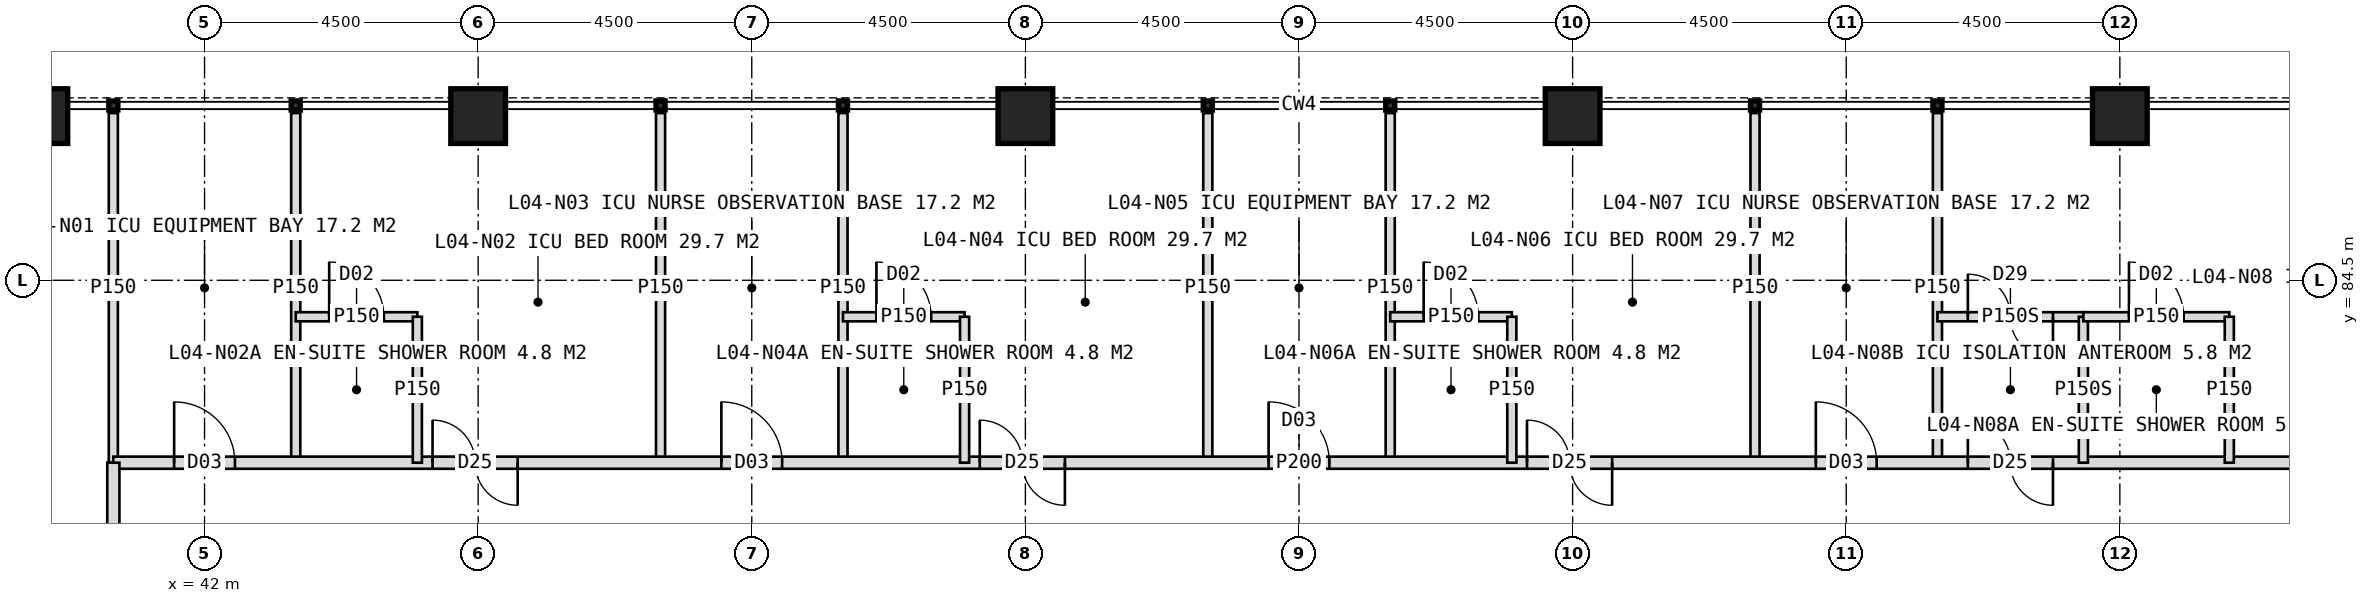
"""IFC4 building model, lengths in metres.
Left out: names, types, materials, properties, quantities, classifications, styles, units other than length and angle.
Written with IfcOpenShell. Run it as: python <this file> out.ifc"""

import sys

from ifc_helpers import new_model, si_unit, direction, frame, frame_2d, origin, origin_2d, place, context, subcontext, project, spatial, rectangle, hollow_rectangle, extrude, element, fill, save


model = new_model("IFC4")
c1 = context("Model", 3, precision=1e-05, world=origin(), true_north=direction((0.0, 1.0)))
c2 = subcontext(c1, "Body", "Model", "MODEL_VIEW")
j1 = project(units=[si_unit("LENGTHUNIT", "METRE"), si_unit("PLANEANGLEUNIT", "RADIAN")], contexts=[c1])
p1 = place(None, origin())
s1 = spatial("IfcSite", under=j1, at=p1, CompositionType="ELEMENT")
p2 = place(p1, origin())
s2 = spatial("IfcBuilding", under=s1, at=p2, CompositionType="ELEMENT")
p3 = place(p2, frame((0.0, 0.0, 21.0)))
s3 = spatial("IfcBuildingStorey", under=s2, at=p3, CompositionType="ELEMENT", Elevation=21.0)
for number, where, z_axis, x_axis in (
    (1, (39.3, 87.2, 0.0), (0.0, 0.0, 1.0), (1.0, 0.0, 0.0)),
    (2, (46.5, 87.2, 0.0), (0.0, 0.0, 1.0), (1.0, 0.0, 0.0)),
    (3, (55.5, 87.2, 0.0), (0.0, 0.0, 1.0), (1.0, 0.0, 0.0)),
    (4, (64.5, 87.2, 0.0), (0.0, 0.0, 1.0), (1.0, 0.0, 0.0)),
    (5, (73.5, 87.2, 0.0), (0.0, 0.0, 1.0), (1.0, 0.0, 0.0)),
):
    element("IfcColumn", number, at=place(p3, frame(where, z_axis=z_axis, x_axis=x_axis)), inside=s3, PredefinedType="COLUMN", context=c2, shape_type="SweptSolid", body=[
        extrude(hollow_rectangle(XDim=0.9, YDim=0.9, WallThickness=0.08, at=origin_2d()), origin(), (0.0, 0.0, 1.0), 5.0),
    ])
for number, where, z_axis, x_axis in (
    (6, (40.5, 81.5, 0.0), (0.0, 0.0, 1.0), (0.0, 1.0, 0.0)),
    (7, (43.5, 81.5, 0.0), (0.0, 0.0, 1.0), (0.0, 1.0, 0.0)),
    (8, (49.5, 81.5, 0.0), (0.0, 0.0, 1.0), (0.0, 1.0, 0.0)),
    (9, (52.5, 81.5, 0.0), (0.0, 0.0, 1.0), (0.0, 1.0, 0.0)),
    (10, (58.5, 81.5, 0.0), (0.0, 0.0, 1.0), (0.0, 1.0, 0.0)),
    (11, (61.5, 81.5, 0.0), (0.0, 0.0, 1.0), (0.0, 1.0, 0.0)),
    (12, (67.5, 81.5, 0.0), (0.0, 0.0, 1.0), (0.0, 1.0, 0.0)),
    (13, (70.5, 81.5, 0.0), (0.0, 0.0, 1.0), (0.0, 1.0, 0.0)),
):
    element("IfcWall", number, at=place(p3, frame(where, z_axis=z_axis, x_axis=x_axis)), inside=s3, PredefinedType="PARTITIONING", context=c2, shape_type="SweptSolid", body=[
        extrude(rectangle(XDim=5.75, YDim=0.15, at=frame_2d((2.875, 0.0))), origin(), (0.0, 0.0, 1.0), 4.7),
    ])
p4 = place(p3, frame((40.5, 81.5, 0.0), z_axis=(0.0, 0.0, 1.0), x_axis=(1.0, 0.0, 0.0)))
e14 = element("IfcWall", 14, at=p4, inside=s3, PredefinedType="PARTITIONING", context=c2, shape_type="SweptSolid", body=[
    extrude(rectangle(XDim=39.0, YDim=0.2, at=frame_2d((19.5, 0.0))), origin(), (0.0, 0.0, 1.0), 4.7),
])
p5 = place(p4, frame((1.0, 0.0, 0.0)))
e15 = element("IfcOpeningElement", 15, at=p5, cuts=e14, PredefinedType="OPENING", context=c2, shape_type="SweptSolid", body=[
    extrude(rectangle(XDim=1.0, YDim=2.1, at=frame_2d((0.5, 1.05))), frame((0.0, 0.11, 0.0), z_axis=(0.0, -1.0, 0.0), x_axis=(1.0, 0.0, 0.0)), (0.0, 0.0, 1.0), 0.22),
])
p6 = place(p4, frame((5.25, 0.0, 0.0)))
e16 = element("IfcOpeningElement", 16, at=p6, cuts=e14, PredefinedType="OPENING", context=c2, shape_type="SweptSolid", body=[
    extrude(rectangle(XDim=1.4, YDim=2.2, at=frame_2d((0.7, 1.1))), frame((0.0, 0.11, 0.0), z_axis=(0.0, -1.0, 0.0), x_axis=(1.0, 0.0, 0.0)), (0.0, 0.0, 1.0), 0.22),
])
p7 = place(p4, frame((10.0, 0.0, 0.0)))
e17 = element("IfcOpeningElement", 17, at=p7, cuts=e14, PredefinedType="OPENING", context=c2, shape_type="SweptSolid", body=[
    extrude(rectangle(XDim=1.0, YDim=2.1, at=frame_2d((0.5, 1.05))), frame((0.0, 0.11, 0.0), z_axis=(0.0, -1.0, 0.0), x_axis=(1.0, 0.0, 0.0)), (0.0, 0.0, 1.0), 0.22),
])
p8 = place(p4, frame((14.25, 0.0, 0.0)))
e18 = element("IfcOpeningElement", 18, at=p8, cuts=e14, PredefinedType="OPENING", context=c2, shape_type="SweptSolid", body=[
    extrude(rectangle(XDim=1.4, YDim=2.2, at=frame_2d((0.7, 1.1))), frame((0.0, 0.11, 0.0), z_axis=(0.0, -1.0, 0.0), x_axis=(1.0, 0.0, 0.0)), (0.0, 0.0, 1.0), 0.22),
])
p9 = place(p4, frame((19.0, 0.0, 0.0)))
e19 = element("IfcOpeningElement", 19, at=p9, cuts=e14, PredefinedType="OPENING", context=c2, shape_type="SweptSolid", body=[
    extrude(rectangle(XDim=1.0, YDim=2.1, at=frame_2d((0.5, 1.05))), frame((0.0, 0.11, 0.0), z_axis=(0.0, -1.0, 0.0), x_axis=(1.0, 0.0, 0.0)), (0.0, 0.0, 1.0), 0.22),
])
p10 = place(p4, frame((23.25, 0.0, 0.0)))
e20 = element("IfcOpeningElement", 20, at=p10, cuts=e14, PredefinedType="OPENING", context=c2, shape_type="SweptSolid", body=[
    extrude(rectangle(XDim=1.4, YDim=2.2, at=frame_2d((0.7, 1.1))), frame((0.0, 0.11, 0.0), z_axis=(0.0, -1.0, 0.0), x_axis=(1.0, 0.0, 0.0)), (0.0, 0.0, 1.0), 0.22),
])
p11 = place(p4, frame((28.0, 0.0, 0.0)))
e21 = element("IfcOpeningElement", 21, at=p11, cuts=e14, PredefinedType="OPENING", context=c2, shape_type="SweptSolid", body=[
    extrude(rectangle(XDim=1.0, YDim=2.1, at=frame_2d((0.5, 1.05))), frame((0.0, 0.11, 0.0), z_axis=(0.0, -1.0, 0.0), x_axis=(1.0, 0.0, 0.0)), (0.0, 0.0, 1.0), 0.22),
])
p12 = place(p4, frame((30.5, 0.0, 0.0)))
e22 = element("IfcOpeningElement", 22, at=p12, cuts=e14, PredefinedType="OPENING", context=c2, shape_type="SweptSolid", body=[
    extrude(rectangle(XDim=1.4, YDim=2.2, at=frame_2d((0.7, 1.1))), frame((0.0, 0.11, 0.0), z_axis=(0.0, -1.0, 0.0), x_axis=(1.0, 0.0, 0.0)), (0.0, 0.0, 1.0), 0.22),
])
p13 = place(p3, frame((43.5, 83.9, 0.0), z_axis=(0.0, 0.0, 1.0), x_axis=(1.0, 0.0, 0.0)))
e23 = element("IfcWall", 23, at=p13, inside=s3, PredefinedType="PARTITIONING", context=c2, shape_type="SweptSolid", body=[
    extrude(rectangle(XDim=2.0, YDim=0.15, at=frame_2d((1.0, 0.0))), origin(), (0.0, 0.0, 1.0), 4.7),
])
p14 = place(p13, frame((0.55, 0.0, 0.0)))
e24 = element("IfcOpeningElement", 24, at=p14, cuts=e23, PredefinedType="OPENING", context=c2, shape_type="SweptSolid", body=[
    extrude(rectangle(XDim=0.9, YDim=2.1, at=frame_2d((0.45, 1.05))), frame((0.0, 0.085, 0.0), z_axis=(0.0, -1.0, 0.0), x_axis=(1.0, 0.0, 0.0)), (0.0, 0.0, 1.0), 0.17),
])
p15 = place(p3, frame((45.5, 81.5, 0.0), z_axis=(0.0, 0.0, 1.0), x_axis=(0.0, 1.0, 0.0)))
e25 = element("IfcWall", 25, at=p15, inside=s3, PredefinedType="PARTITIONING", context=c2, shape_type="SweptSolid", body=[
    extrude(rectangle(XDim=2.4, YDim=0.15, at=frame_2d((1.2, 0.0))), origin(), (0.0, 0.0, 1.0), 4.7),
])
p16 = place(p3, frame((52.5, 83.9, 0.0), z_axis=(0.0, 0.0, 1.0), x_axis=(1.0, 0.0, 0.0)))
e26 = element("IfcWall", 26, at=p16, inside=s3, PredefinedType="PARTITIONING", context=c2, shape_type="SweptSolid", body=[
    extrude(rectangle(XDim=2.0, YDim=0.15, at=frame_2d((1.0, 0.0))), origin(), (0.0, 0.0, 1.0), 4.7),
])
p17 = place(p16, frame((0.55, 0.0, 0.0)))
e27 = element("IfcOpeningElement", 27, at=p17, cuts=e26, PredefinedType="OPENING", context=c2, shape_type="SweptSolid", body=[
    extrude(rectangle(XDim=0.9, YDim=2.1, at=frame_2d((0.45, 1.05))), frame((0.0, 0.085, 0.0), z_axis=(0.0, -1.0, 0.0), x_axis=(1.0, 0.0, 0.0)), (0.0, 0.0, 1.0), 0.17),
])
p18 = place(p3, frame((54.5, 81.5, 0.0), z_axis=(0.0, 0.0, 1.0), x_axis=(0.0, 1.0, 0.0)))
e28 = element("IfcWall", 28, at=p18, inside=s3, PredefinedType="PARTITIONING", context=c2, shape_type="SweptSolid", body=[
    extrude(rectangle(XDim=2.4, YDim=0.15, at=frame_2d((1.2, 0.0))), origin(), (0.0, 0.0, 1.0), 4.7),
])
p19 = place(p3, frame((61.5, 83.9, 0.0), z_axis=(0.0, 0.0, 1.0), x_axis=(1.0, 0.0, 0.0)))
e29 = element("IfcWall", 29, at=p19, inside=s3, PredefinedType="PARTITIONING", context=c2, shape_type="SweptSolid", body=[
    extrude(rectangle(XDim=2.0, YDim=0.15, at=frame_2d((1.0, 0.0))), origin(), (0.0, 0.0, 1.0), 4.7),
])
p20 = place(p19, frame((0.55, 0.0, 0.0)))
e30 = element("IfcOpeningElement", 30, at=p20, cuts=e29, PredefinedType="OPENING", context=c2, shape_type="SweptSolid", body=[
    extrude(rectangle(XDim=0.9, YDim=2.1, at=frame_2d((0.45, 1.05))), frame((0.0, 0.085, 0.0), z_axis=(0.0, -1.0, 0.0), x_axis=(1.0, 0.0, 0.0)), (0.0, 0.0, 1.0), 0.17),
])
p21 = place(p3, frame((63.5, 81.5, 0.0), z_axis=(0.0, 0.0, 1.0), x_axis=(0.0, 1.0, 0.0)))
e31 = element("IfcWall", 31, at=p21, inside=s3, PredefinedType="PARTITIONING", context=c2, shape_type="SweptSolid", body=[
    extrude(rectangle(XDim=2.4, YDim=0.15, at=frame_2d((1.2, 0.0))), origin(), (0.0, 0.0, 1.0), 4.7),
])
p22 = place(p3, frame((70.5, 83.9, 0.0), z_axis=(0.0, 0.0, 1.0), x_axis=(1.0, 0.0, 0.0)))
e32 = element("IfcWall", 32, at=p22, inside=s3, PredefinedType="PARTITIONING", context=c2, shape_type="SweptSolid", body=[
    extrude(rectangle(XDim=2.4, YDim=0.15, at=frame_2d((1.2, 0.0))), origin(), (0.0, 0.0, 1.0), 4.7),
])
p23 = place(p22, frame((0.5, 0.0, 0.0)))
e33 = element("IfcOpeningElement", 33, at=p23, cuts=e32, PredefinedType="OPENING", context=c2, shape_type="SweptSolid", body=[
    extrude(rectangle(XDim=1.4, YDim=2.2, at=frame_2d((0.7, 1.1))), frame((0.0, 0.085, 0.0), z_axis=(0.0, -1.0, 0.0), x_axis=(1.0, 0.0, 0.0)), (0.0, 0.0, 1.0), 0.17),
])
p24 = place(p3, frame((72.9, 81.5, 0.0), z_axis=(0.0, 0.0, 1.0), x_axis=(0.0, 1.0, 0.0)))
e34 = element("IfcWall", 34, at=p24, inside=s3, PredefinedType="PARTITIONING", context=c2, shape_type="SweptSolid", body=[
    extrude(rectangle(XDim=2.4, YDim=0.15, at=frame_2d((1.2, 0.0))), origin(), (0.0, 0.0, 1.0), 4.7),
])
p25 = place(p3, frame((72.9, 83.9, 0.0), z_axis=(0.0, 0.0, 1.0), x_axis=(1.0, 0.0, 0.0)))
e35 = element("IfcWall", 35, at=p25, inside=s3, PredefinedType="PARTITIONING", context=c2, shape_type="SweptSolid", body=[
    extrude(rectangle(XDim=2.4, YDim=0.15, at=frame_2d((1.2, 0.0))), origin(), (0.0, 0.0, 1.0), 4.7),
])
p26 = place(p25, frame((0.75, 0.0, 0.0)))
e36 = element("IfcOpeningElement", 36, at=p26, cuts=e35, PredefinedType="OPENING", context=c2, shape_type="SweptSolid", body=[
    extrude(rectangle(XDim=0.9, YDim=2.1, at=frame_2d((0.45, 1.05))), frame((0.0, 0.085, 0.0), z_axis=(0.0, -1.0, 0.0), x_axis=(1.0, 0.0, 0.0)), (0.0, 0.0, 1.0), 0.17),
])
p27 = place(p3, frame((75.3, 81.5, 0.0), z_axis=(0.0, 0.0, 1.0), x_axis=(0.0, 1.0, 0.0)))
e37 = element("IfcWall", 37, at=p27, inside=s3, PredefinedType="PARTITIONING", context=c2, shape_type="SweptSolid", body=[
    extrude(rectangle(XDim=2.4, YDim=0.15, at=frame_2d((1.2, 0.0))), origin(), (0.0, 0.0, 1.0), 4.7),
])
p28 = place(p3, frame((40.5, 42.5, 0.0), z_axis=(0.0, 0.0, 1.0), x_axis=(0.0, 1.0, 0.0)))
e38 = element("IfcWall", 38, at=p28, inside=s3, PredefinedType="PARTITIONING", context=c2, shape_type="SweptSolid", body=[
    extrude(rectangle(XDim=39.0, YDim=0.2, at=frame_2d((19.5, 0.0))), origin(), (0.0, 0.0, 1.0), 4.7),
])
p29 = place(p28, frame((0.65, 0.0, 0.0)))
e39 = element("IfcOpeningElement", 39, at=p29, cuts=e38, PredefinedType="OPENING", context=c2, shape_type="SweptSolid", body=[
    extrude(rectangle(XDim=1.6, YDim=2.2, at=frame_2d((0.8, 1.1))), frame((0.0, 0.11, 0.0), z_axis=(0.0, -1.0, 0.0), x_axis=(1.0, 0.0, 0.0)), (0.0, 0.0, 1.0), 0.22),
])
p30 = place(p28, frame((7.4, 0.0, 0.0)))
e40 = element("IfcOpeningElement", 40, at=p30, cuts=e38, PredefinedType="OPENING", context=c2, shape_type="SweptSolid", body=[
    extrude(rectangle(XDim=1.6, YDim=2.2, at=frame_2d((0.8, 1.1))), frame((0.0, 0.11, 0.0), z_axis=(0.0, -1.0, 0.0), x_axis=(1.0, 0.0, 0.0)), (0.0, 0.0, 1.0), 0.22),
])
p31 = place(p28, frame((15.7, 0.0, 0.0)))
e41 = element("IfcOpeningElement", 41, at=p31, cuts=e38, PredefinedType="OPENING", context=c2, shape_type="SweptSolid", body=[
    extrude(rectangle(XDim=1.6, YDim=2.2, at=frame_2d((0.8, 1.1))), frame((0.0, 0.11, 0.0), z_axis=(0.0, -1.0, 0.0), x_axis=(1.0, 0.0, 0.0)), (0.0, 0.0, 1.0), 0.22),
])
p32 = place(p28, frame((19.95, 0.0, 0.0)))
e42 = element("IfcOpeningElement", 42, at=p32, cuts=e38, PredefinedType="OPENING", context=c2, shape_type="SweptSolid", body=[
    extrude(rectangle(XDim=1.6, YDim=2.2, at=frame_2d((0.8, 1.1))), frame((0.0, 0.11, 0.0), z_axis=(0.0, -1.0, 0.0), x_axis=(1.0, 0.0, 0.0)), (0.0, 0.0, 1.0), 0.22),
])
p33 = place(p28, frame((24.45, 0.0, 0.0)))
e43 = element("IfcOpeningElement", 43, at=p33, cuts=e38, PredefinedType="OPENING", context=c2, shape_type="SweptSolid", body=[
    extrude(rectangle(XDim=1.6, YDim=2.2, at=frame_2d((0.8, 1.1))), frame((0.0, 0.11, 0.0), z_axis=(0.0, -1.0, 0.0), x_axis=(1.0, 0.0, 0.0)), (0.0, 0.0, 1.0), 0.22),
])
p34 = place(p28, frame((33.25, 0.0, 0.0)))
e44 = element("IfcOpeningElement", 44, at=p34, cuts=e38, PredefinedType="OPENING", context=c2, shape_type="SweptSolid", body=[
    extrude(rectangle(XDim=1.0, YDim=2.1, at=frame_2d((0.5, 1.05))), frame((0.0, 0.11, 0.0), z_axis=(0.0, -1.0, 0.0), x_axis=(1.0, 0.0, 0.0)), (0.0, 0.0, 1.0), 0.22),
])
p35 = place(p5, origin())
e45 = element("IfcDoor", 45, at=p35, inside=s3, OperationType="SINGLE_SWING_LEFT", PredefinedType="DOOR", context=c2, shape_type="SweptSolid", body=[
    extrude(rectangle(XDim=1.0, YDim=2.1, at=frame_2d((0.5, 1.05))), frame((0.0, 0.025, 0.0), z_axis=(0.0, -1.0, 0.0), x_axis=(1.0, 0.0, 0.0)), (0.0, 0.0, 1.0), 0.05),
])
fill(e15, e45)
p36 = place(p14, origin())
e46 = element("IfcDoor", 46, at=p36, inside=s3, OperationType="SINGLE_SWING_LEFT", PredefinedType="DOOR", context=c2, shape_type="SweptSolid", body=[
    extrude(rectangle(XDim=0.9, YDim=2.1, at=frame_2d((0.45, 1.05))), frame((0.0, 0.025, 0.0), z_axis=(0.0, -1.0, 0.0), x_axis=(1.0, 0.0, 0.0)), (0.0, 0.0, 1.0), 0.05),
])
fill(e24, e46)
p37 = place(p6, origin())
e47 = element("IfcDoor", 47, at=p37, inside=s3, OperationType="DOUBLE_DOOR_SINGLE_SWING", PredefinedType="DOOR", context=c2, shape_type="SweptSolid", body=[
    extrude(rectangle(XDim=1.4, YDim=2.2, at=frame_2d((0.7, 1.1))), frame((0.0, 0.025, 0.0), z_axis=(0.0, -1.0, 0.0), x_axis=(1.0, 0.0, 0.0)), (0.0, 0.0, 1.0), 0.05),
])
fill(e16, e47)
p38 = place(p7, origin())
e48 = element("IfcDoor", 48, at=p38, inside=s3, OperationType="SINGLE_SWING_LEFT", PredefinedType="DOOR", context=c2, shape_type="SweptSolid", body=[
    extrude(rectangle(XDim=1.0, YDim=2.1, at=frame_2d((0.5, 1.05))), frame((0.0, 0.025, 0.0), z_axis=(0.0, -1.0, 0.0), x_axis=(1.0, 0.0, 0.0)), (0.0, 0.0, 1.0), 0.05),
])
fill(e17, e48)
p39 = place(p17, origin())
e49 = element("IfcDoor", 49, at=p39, inside=s3, OperationType="SINGLE_SWING_LEFT", PredefinedType="DOOR", context=c2, shape_type="SweptSolid", body=[
    extrude(rectangle(XDim=0.9, YDim=2.1, at=frame_2d((0.45, 1.05))), frame((0.0, 0.025, 0.0), z_axis=(0.0, -1.0, 0.0), x_axis=(1.0, 0.0, 0.0)), (0.0, 0.0, 1.0), 0.05),
])
fill(e27, e49)
p40 = place(p8, origin())
e50 = element("IfcDoor", 50, at=p40, inside=s3, OperationType="DOUBLE_DOOR_SINGLE_SWING", PredefinedType="DOOR", context=c2, shape_type="SweptSolid", body=[
    extrude(rectangle(XDim=1.4, YDim=2.2, at=frame_2d((0.7, 1.1))), frame((0.0, 0.025, 0.0), z_axis=(0.0, -1.0, 0.0), x_axis=(1.0, 0.0, 0.0)), (0.0, 0.0, 1.0), 0.05),
])
fill(e18, e50)
p41 = place(p9, origin())
e51 = element("IfcDoor", 51, at=p41, inside=s3, OperationType="SINGLE_SWING_LEFT", PredefinedType="DOOR", context=c2, shape_type="SweptSolid", body=[
    extrude(rectangle(XDim=1.0, YDim=2.1, at=frame_2d((0.5, 1.05))), frame((0.0, 0.025, 0.0), z_axis=(0.0, -1.0, 0.0), x_axis=(1.0, 0.0, 0.0)), (0.0, 0.0, 1.0), 0.05),
])
fill(e19, e51)
p42 = place(p20, origin())
e52 = element("IfcDoor", 52, at=p42, inside=s3, OperationType="SINGLE_SWING_LEFT", PredefinedType="DOOR", context=c2, shape_type="SweptSolid", body=[
    extrude(rectangle(XDim=0.9, YDim=2.1, at=frame_2d((0.45, 1.05))), frame((0.0, 0.025, 0.0), z_axis=(0.0, -1.0, 0.0), x_axis=(1.0, 0.0, 0.0)), (0.0, 0.0, 1.0), 0.05),
])
fill(e30, e52)
p43 = place(p10, origin())
e53 = element("IfcDoor", 53, at=p43, inside=s3, OperationType="DOUBLE_DOOR_SINGLE_SWING", PredefinedType="DOOR", context=c2, shape_type="SweptSolid", body=[
    extrude(rectangle(XDim=1.4, YDim=2.2, at=frame_2d((0.7, 1.1))), frame((0.0, 0.025, 0.0), z_axis=(0.0, -1.0, 0.0), x_axis=(1.0, 0.0, 0.0)), (0.0, 0.0, 1.0), 0.05),
])
fill(e20, e53)
p44 = place(p11, origin())
e54 = element("IfcDoor", 54, at=p44, inside=s3, OperationType="SINGLE_SWING_LEFT", PredefinedType="DOOR", context=c2, shape_type="SweptSolid", body=[
    extrude(rectangle(XDim=1.0, YDim=2.1, at=frame_2d((0.5, 1.05))), frame((0.0, 0.025, 0.0), z_axis=(0.0, -1.0, 0.0), x_axis=(1.0, 0.0, 0.0)), (0.0, 0.0, 1.0), 0.05),
])
fill(e21, e54)
p45 = place(p23, origin())
e55 = element("IfcDoor", 55, at=p45, inside=s3, OperationType="DOUBLE_DOOR_SINGLE_SWING", PredefinedType="DOOR", context=c2, shape_type="SweptSolid", body=[
    extrude(rectangle(XDim=1.4, YDim=2.2, at=frame_2d((0.7, 1.1))), frame((0.0, 0.025, 0.0), z_axis=(0.0, -1.0, 0.0), x_axis=(1.0, 0.0, 0.0)), (0.0, 0.0, 1.0), 0.05),
])
fill(e33, e55)
p46 = place(p12, origin())
e56 = element("IfcDoor", 56, at=p46, inside=s3, OperationType="DOUBLE_DOOR_SINGLE_SWING", PredefinedType="DOOR", context=c2, shape_type="SweptSolid", body=[
    extrude(rectangle(XDim=1.4, YDim=2.2, at=frame_2d((0.7, 1.1))), frame((0.0, 0.025, 0.0), z_axis=(0.0, -1.0, 0.0), x_axis=(1.0, 0.0, 0.0)), (0.0, 0.0, 1.0), 0.05),
])
fill(e22, e56)
p47 = place(p26, origin())
e57 = element("IfcDoor", 57, at=p47, inside=s3, OperationType="SINGLE_SWING_LEFT", PredefinedType="DOOR", context=c2, shape_type="SweptSolid", body=[
    extrude(rectangle(XDim=0.9, YDim=2.1, at=frame_2d((0.45, 1.05))), frame((0.0, 0.025, 0.0), z_axis=(0.0, -1.0, 0.0), x_axis=(1.0, 0.0, 0.0)), (0.0, 0.0, 1.0), 0.05),
])
fill(e36, e57)
save(model, sys.argv[1])
